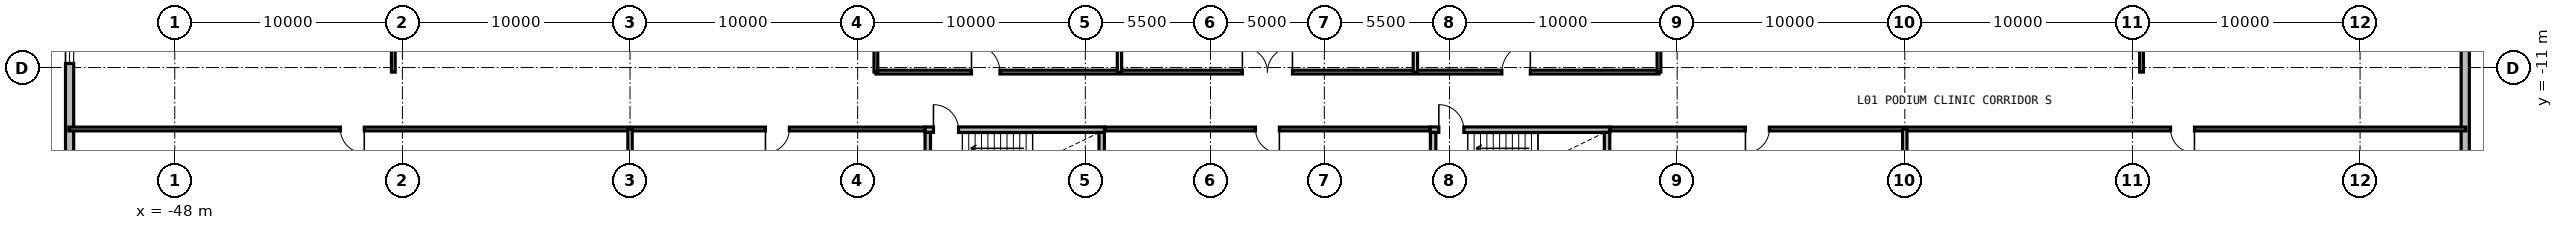
"""IFC4 building model, lengths in metres.
Left out: names, types, materials, properties, quantities, classifications, styles, units other than length and angle.
Written with IfcOpenShell. Run it as: python <this file> out.ifc"""

import sys

from ifc_helpers import new_model, si_unit, direction, frame, frame_2d, origin, place, context, subcontext, project, spatial, rectangle, extrude, source, transform, mapped, element, fill, save


model = new_model("IFC4")
c1 = context("Model", 3, precision=1e-05, world=origin(), true_north=direction((0.0, 1.0)))
c2 = subcontext(c1, "Body", "Model", "MODEL_VIEW")
j1 = project(units=[si_unit("LENGTHUNIT", "METRE"), si_unit("PLANEANGLEUNIT", "RADIAN")], contexts=[c1])
p1 = place(None, origin())
s1 = spatial("IfcSite", under=j1, at=p1, CompositionType="ELEMENT")
p2 = place(p1, origin())
s2 = spatial("IfcBuilding", under=s1, at=p2, CompositionType="ELEMENT")
p3 = place(p2, frame((0.0, 0.0, 4.2)))
s3 = spatial("IfcBuildingStorey", under=s2, at=p3, CompositionType="ELEMENT", Elevation=4.2)
m1 = source(origin(), c2, "Body", "SweptSolid", [
    extrude(rectangle(XDim=46.44, YDim=0.36, at=frame_2d((23.22, 0.0))), origin(), (0.0, 0.0, 1.0), 3.88),
])
p4 = place(p3, frame((-52.62, -23.22, 0.0), z_axis=(0.0, 0.0, 1.0), x_axis=(0.0, 1.0, 0.0)))
e1 = element("IfcWall", 1, at=p4, inside=s3, PredefinedType="SOLIDWALL", context=c2, shape_type="MappedRepresentation", body=[
    mapped(m1, transform((0.0, 0.0, 0.0), x_axis=(1.0, 0.0, 0.0), y_axis=(0.0, 1.0, 0.0), z_axis=(0.0, 0.0, 1.0), scale=1.0)),
])
p5 = place(p4, frame((4.0, 0.0, 0.85)))
e2 = element("IfcOpeningElement", 2, at=p5, cuts=e1, PredefinedType="OPENING", context=c2, shape_type="SweptSolid", body=[
    extrude(rectangle(XDim=3.0, YDim=2.1, at=frame_2d((1.5, 1.05))), frame((0.0, 0.19, 0.0), z_axis=(0.0, -1.0, 0.0), x_axis=(1.0, 0.0, 0.0)), (0.0, 0.0, 1.0), 0.38),
])
p6 = place(p4, frame((12.4, 0.0, 0.9)))
e3 = element("IfcOpeningElement", 3, at=p6, cuts=e1, PredefinedType="OPENING", context=c2, shape_type="SweptSolid", body=[
    extrude(rectangle(XDim=1.8, YDim=2.0, at=frame_2d((0.9, 1.0))), frame((0.0, 0.19, 0.0), z_axis=(0.0, -1.0, 0.0), x_axis=(1.0, 0.0, 0.0)), (0.0, 0.0, 1.0), 0.38),
])
p7 = place(p3, frame((52.62, 23.22, 0.0), z_axis=(0.0, 0.0, 1.0), x_axis=(0.0, -1.0, 0.0)))
e4 = element("IfcWall", 4, at=p7, inside=s3, PredefinedType="SOLIDWALL", context=c2, shape_type="MappedRepresentation", body=[
    mapped(m1, transform((0.0, 0.0, 0.0), x_axis=(1.0, 0.0, 0.0), y_axis=(0.0, 1.0, 0.0), z_axis=(0.0, 0.0, 1.0), scale=1.0)),
])
p8 = place(p7, frame((4.0, 0.0, 0.85)))
e5 = element("IfcOpeningElement", 5, at=p8, cuts=e4, PredefinedType="OPENING", context=c2, shape_type="SweptSolid", body=[
    extrude(rectangle(XDim=3.0, YDim=2.1, at=frame_2d((1.5, 1.05))), frame((0.0, 0.19, 0.0), z_axis=(0.0, -1.0, 0.0), x_axis=(1.0, 0.0, 0.0)), (0.0, 0.0, 1.0), 0.38),
])
p9 = place(p7, frame((29.2, 0.0, 0.85)))
e6 = element("IfcOpeningElement", 6, at=p9, cuts=e4, PredefinedType="OPENING", context=c2, shape_type="SweptSolid", body=[
    extrude(rectangle(XDim=3.0, YDim=2.1, at=frame_2d((1.5, 1.05))), frame((0.0, 0.19, 0.0), z_axis=(0.0, -1.0, 0.0), x_axis=(1.0, 0.0, 0.0)), (0.0, 0.0, 1.0), 0.38),
])
m2 = source(origin(), c2, "Body", "SweptSolid", [
    extrude(rectangle(XDim=7.88, YDim=0.24, at=frame_2d((3.94, 0.0))), origin(), (0.0, 0.0, 1.0), 3.88),
])
p10 = place(p3, frame((-15.04, -13.73, 0.0), z_axis=(0.0, 0.0, 1.0), x_axis=(1.0, 0.0, 0.0)))
e7 = element("IfcWall", 7, at=p10, inside=s3, PredefinedType="PARTITIONING", context=c2, shape_type="MappedRepresentation", body=[
    mapped(m2, transform((0.0, 0.0, 0.0), x_axis=(1.0, 0.0, 0.0), y_axis=(0.0, 1.0, 0.0), z_axis=(0.0, 0.0, 1.0), scale=1.0)),
])
p11 = place(p10, frame((0.37, 0.0, 0.0)))
e8 = element("IfcOpeningElement", 8, at=p11, cuts=e7, PredefinedType="OPENING", context=c2, shape_type="SweptSolid", body=[
    extrude(rectangle(XDim=1.1, YDim=2.15, at=frame_2d((0.55, 1.075))), frame((0.0, 0.13, 0.0), z_axis=(0.0, -1.0, 0.0), x_axis=(1.0, 0.0, 0.0)), (0.0, 0.0, 1.0), 0.26),
])
m3 = source(origin(), c2, "Body", "SweptSolid", [
    extrude(rectangle(XDim=2.95, YDim=0.24, at=frame_2d((1.475, 0.0))), origin(), (0.0, 0.0, 1.0), 3.88),
])
for number, where, z_axis, x_axis in (
    (9, (-14.92, -16.8, 0.0), (0.0, 0.0, 1.0), (0.0, 1.0, 0.0)),
    (10, (-7.28, -16.8, 0.0), (0.0, 0.0, 1.0), (0.0, 1.0, 0.0)),
):
    element("IfcWall", number, at=place(p3, frame(where, z_axis=z_axis, x_axis=x_axis)), inside=s3, PredefinedType="PARTITIONING", context=c2, shape_type="MappedRepresentation", body=[
        mapped(m3, transform((0.0, 0.0, 0.0), x_axis=(1.0, 0.0, 0.0), y_axis=(0.0, 1.0, 0.0), z_axis=(0.0, 0.0, 1.0), scale=1.0)),
    ])
p12 = place(p3, frame((7.16, -13.73, 0.0), z_axis=(0.0, 0.0, 1.0), x_axis=(1.0, 0.0, 0.0)))
e11 = element("IfcWall", 11, at=p12, inside=s3, PredefinedType="PARTITIONING", context=c2, shape_type="MappedRepresentation", body=[
    mapped(m2, transform((0.0, 0.0, 0.0), x_axis=(1.0, 0.0, 0.0), y_axis=(0.0, 1.0, 0.0), z_axis=(0.0, 0.0, 1.0), scale=1.0)),
])
p13 = place(p12, frame((0.37, 0.0, 0.0)))
e12 = element("IfcOpeningElement", 12, at=p13, cuts=e11, PredefinedType="OPENING", context=c2, shape_type="SweptSolid", body=[
    extrude(rectangle(XDim=1.1, YDim=2.15, at=frame_2d((0.55, 1.075))), frame((0.0, 0.13, 0.0), z_axis=(0.0, -1.0, 0.0), x_axis=(1.0, 0.0, 0.0)), (0.0, 0.0, 1.0), 0.26),
])
for number, where, z_axis, x_axis in (
    (13, (7.28, -16.8, 0.0), (0.0, 0.0, 1.0), (0.0, 1.0, 0.0)),
    (14, (14.92, -16.8, 0.0), (0.0, 0.0, 1.0), (0.0, 1.0, 0.0)),
):
    element("IfcWall", number, at=place(p3, frame(where, z_axis=z_axis, x_axis=x_axis)), inside=s3, PredefinedType="PARTITIONING", context=c2, shape_type="MappedRepresentation", body=[
        mapped(m3, transform((0.0, 0.0, 0.0), x_axis=(1.0, 0.0, 0.0), y_axis=(0.0, 1.0, 0.0), z_axis=(0.0, 0.0, 1.0), scale=1.0)),
    ])
m4 = source(origin(), c2, "Body", "SweptSolid", [
    extrude(rectangle(XDim=17.6, YDim=0.165, at=frame_2d((8.8, 0.0))), origin(), (0.0, 0.0, 1.0), 3.865),
])
p14 = place(p3, frame((-38.4, -11.2, 0.0), z_axis=(0.0, 0.0, 1.0), x_axis=(0.0, 1.0, 0.0)))
e15 = element("IfcWall", 15, at=p14, inside=s3, PredefinedType="PARTITIONING", context=c2, shape_type="MappedRepresentation", body=[
    mapped(m4, transform((0.0, 0.0, 0.0), x_axis=(1.0, 0.0, 0.0), y_axis=(0.0, 1.0, 0.0), z_axis=(0.0, 0.0, 1.0), scale=1.0)),
])
p15 = place(p14, frame((4.2, 0.0, 0.0)))
e16 = element("IfcOpeningElement", 16, at=p15, cuts=e15, PredefinedType="OPENING", context=c2, shape_type="SweptSolid", body=[
    extrude(rectangle(XDim=1.25, YDim=2.2, at=frame_2d((0.625, 1.1))), frame((0.0, 0.093, 0.0), z_axis=(0.0, -1.0, 0.0), x_axis=(1.0, 0.0, 0.0)), (0.0, 0.0, 1.0), 0.185),
])
p16 = place(p14, frame((13.5, 0.0, 0.0)))
e17 = element("IfcOpeningElement", 17, at=p16, cuts=e15, PredefinedType="OPENING", context=c2, shape_type="SweptSolid", body=[
    extrude(rectangle(XDim=1.25, YDim=2.2, at=frame_2d((0.625, 1.1))), frame((0.0, 0.093, 0.0), z_axis=(0.0, -1.0, 0.0), x_axis=(1.0, 0.0, 0.0)), (0.0, 0.0, 1.0), 0.185),
])
p17 = place(p3, frame((38.4, -11.2, 0.0), z_axis=(0.0, 0.0, 1.0), x_axis=(0.0, 1.0, 0.0)))
e18 = element("IfcWall", 18, at=p17, inside=s3, PredefinedType="PARTITIONING", context=c2, shape_type="MappedRepresentation", body=[
    mapped(m4, transform((0.0, 0.0, 0.0), x_axis=(1.0, 0.0, 0.0), y_axis=(0.0, 1.0, 0.0), z_axis=(0.0, 0.0, 1.0), scale=1.0)),
])
p18 = place(p17, frame((4.2, 0.0, 0.0)))
e19 = element("IfcOpeningElement", 19, at=p18, cuts=e18, PredefinedType="OPENING", context=c2, shape_type="SweptSolid", body=[
    extrude(rectangle(XDim=1.25, YDim=2.2, at=frame_2d((0.625, 1.1))), frame((0.0, 0.093, 0.0), z_axis=(0.0, -1.0, 0.0), x_axis=(1.0, 0.0, 0.0)), (0.0, 0.0, 1.0), 0.185),
])
p19 = place(p17, frame((13.5, 0.0, 0.0)))
e20 = element("IfcOpeningElement", 20, at=p19, cuts=e18, PredefinedType="OPENING", context=c2, shape_type="SweptSolid", body=[
    extrude(rectangle(XDim=1.25, YDim=2.2, at=frame_2d((0.625, 1.1))), frame((0.0, 0.093, 0.0), z_axis=(0.0, -1.0, 0.0), x_axis=(1.0, 0.0, 0.0)), (0.0, 0.0, 1.0), 0.185),
])
m5 = source(origin(), c2, "Body", "SweptSolid", [
    extrude(rectangle(XDim=34.4, YDim=0.165, at=frame_2d((17.2, 0.0))), origin(), (0.0, 0.0, 1.0), 3.865),
])
p20 = place(p3, frame((-17.2, -11.2, 0.0), z_axis=(0.0, 0.0, 1.0), x_axis=(1.0, 0.0, 0.0)))
e21 = element("IfcWall", 21, at=p20, inside=s3, PredefinedType="PARTITIONING", context=c2, shape_type="MappedRepresentation", body=[
    mapped(m5, transform((0.0, 0.0, 0.0), x_axis=(1.0, 0.0, 0.0), y_axis=(0.0, 1.0, 0.0), z_axis=(0.0, 0.0, 1.0), scale=1.0)),
])
p21 = place(p20, frame((4.2, 0.0, 0.0)))
e22 = element("IfcOpeningElement", 22, at=p21, cuts=e21, PredefinedType="OPENING", context=c2, shape_type="SweptSolid", body=[
    extrude(rectangle(XDim=1.25, YDim=2.2, at=frame_2d((0.625, 1.1))), frame((0.0, 0.093, 0.0), z_axis=(0.0, -1.0, 0.0), x_axis=(1.0, 0.0, 0.0)), (0.0, 0.0, 1.0), 0.185),
])
p22 = place(p20, frame((16.1, 0.0, 0.0)))
e23 = element("IfcOpeningElement", 23, at=p22, cuts=e21, PredefinedType="OPENING", context=c2, shape_type="SweptSolid", body=[
    extrude(rectangle(XDim=2.2, YDim=2.4, at=frame_2d((1.1, 1.2))), frame((0.0, 0.093, 0.0), z_axis=(0.0, -1.0, 0.0), x_axis=(1.0, 0.0, 0.0)), (0.0, 0.0, 1.0), 0.185),
])
p23 = place(p20, frame((27.5, 0.0, 0.0)))
e24 = element("IfcOpeningElement", 24, at=p23, cuts=e21, PredefinedType="OPENING", context=c2, shape_type="SweptSolid", body=[
    extrude(rectangle(XDim=1.25, YDim=2.2, at=frame_2d((0.625, 1.1))), frame((0.0, 0.093, 0.0), z_axis=(0.0, -1.0, 0.0), x_axis=(1.0, 0.0, 0.0)), (0.0, 0.0, 1.0), 0.185),
])
for number, where, z_axis, x_axis in (
    (25, (-17.2, -11.2, 0.0), (0.0, 0.0, 1.0), (0.0, 1.0, 0.0)),
    (26, (17.2, -11.2, 0.0), (0.0, 0.0, 1.0), (0.0, 1.0, 0.0)),
):
    element("IfcWall", number, at=place(p3, frame(where, z_axis=z_axis, x_axis=x_axis)), inside=s3, PredefinedType="PARTITIONING", context=c2, shape_type="MappedRepresentation", body=[
        mapped(m4, transform((0.0, 0.0, 0.0), x_axis=(1.0, 0.0, 0.0), y_axis=(0.0, 1.0, 0.0), z_axis=(0.0, 0.0, 1.0), scale=1.0)),
    ])
m6 = source(origin(), c2, "Body", "SweptSolid", [
    extrude(rectangle(XDim=17.6, YDim=0.19, at=frame_2d((8.8, 0.0))), origin(), (0.0, 0.0, 1.0), 3.215),
])
for number, where, z_axis, x_axis in (
    (27, (-6.5, -11.2, 0.0), (0.0, 0.0, 1.0), (0.0, 1.0, 0.0)),
    (28, (6.5, -11.2, 0.0), (0.0, 0.0, 1.0), (0.0, 1.0, 0.0)),
):
    element("IfcWall", number, at=place(p3, frame(where, z_axis=z_axis, x_axis=x_axis)), inside=s3, PredefinedType="PARTITIONING", context=c2, shape_type="MappedRepresentation", body=[
        mapped(m6, transform((0.0, 0.0, 0.0), x_axis=(1.0, 0.0, 0.0), y_axis=(0.0, 1.0, 0.0), z_axis=(0.0, 0.0, 1.0), scale=1.0)),
    ])
m7 = source(origin(), c2, "Body", "SweptSolid", [
    extrude(rectangle(XDim=37.6, YDim=0.165, at=frame_2d((18.8, 0.0))), origin(), (0.0, 0.0, 1.0), 3.865),
])
p24 = place(p3, frame((-52.65, -13.7, 0.0), z_axis=(0.0, 0.0, 1.0), x_axis=(1.0, 0.0, 0.0)))
e29 = element("IfcWall", 29, at=p24, inside=s3, PredefinedType="PARTITIONING", context=c2, shape_type="MappedRepresentation", body=[
    mapped(m7, transform((0.0, 0.0, 0.0), x_axis=(1.0, 0.0, 0.0), y_axis=(0.0, 1.0, 0.0), z_axis=(0.0, 0.0, 1.0), scale=1.0)),
])
p25 = place(p24, frame((11.925, 0.0, 0.0)))
e30 = element("IfcOpeningElement", 30, at=p25, cuts=e29, PredefinedType="OPENING", context=c2, shape_type="SweptSolid", body=[
    extrude(rectangle(XDim=1.05, YDim=2.15, at=frame_2d((0.525, 1.075))), frame((0.0, 0.093, 0.0), z_axis=(0.0, -1.0, 0.0), x_axis=(1.0, 0.0, 0.0)), (0.0, 0.0, 1.0), 0.185),
])
p26 = place(p24, frame((30.6, 0.0, 0.0)))
e31 = element("IfcOpeningElement", 31, at=p26, cuts=e29, PredefinedType="OPENING", context=c2, shape_type="SweptSolid", body=[
    extrude(rectangle(XDim=1.05, YDim=2.15, at=frame_2d((0.525, 1.075))), frame((0.0, 0.093, 0.0), z_axis=(0.0, -1.0, 0.0), x_axis=(1.0, 0.0, 0.0)), (0.0, 0.0, 1.0), 0.185),
])
m8 = source(origin(), c2, "Body", "SweptSolid", [
    extrude(rectangle(XDim=14.3, YDim=0.165, at=frame_2d((7.15, 0.0))), origin(), (0.0, 0.0, 1.0), 3.865),
])
p27 = place(p3, frame((-7.15, -13.7, 0.0), z_axis=(0.0, 0.0, 1.0), x_axis=(1.0, 0.0, 0.0)))
e32 = element("IfcWall", 32, at=p27, inside=s3, PredefinedType="PARTITIONING", context=c2, shape_type="MappedRepresentation", body=[
    mapped(m8, transform((0.0, 0.0, 0.0), x_axis=(1.0, 0.0, 0.0), y_axis=(0.0, 1.0, 0.0), z_axis=(0.0, 0.0, 1.0), scale=1.0)),
])
p28 = place(p27, frame((6.625, 0.0, 0.0)))
e33 = element("IfcOpeningElement", 33, at=p28, cuts=e32, PredefinedType="OPENING", context=c2, shape_type="SweptSolid", body=[
    extrude(rectangle(XDim=1.05, YDim=2.15, at=frame_2d((0.525, 1.075))), frame((0.0, 0.093, 0.0), z_axis=(0.0, -1.0, 0.0), x_axis=(1.0, 0.0, 0.0)), (0.0, 0.0, 1.0), 0.185),
])
p29 = place(p3, frame((15.05, -13.7, 0.0), z_axis=(0.0, 0.0, 1.0), x_axis=(1.0, 0.0, 0.0)))
e34 = element("IfcWall", 34, at=p29, inside=s3, PredefinedType="PARTITIONING", context=c2, shape_type="MappedRepresentation", body=[
    mapped(m7, transform((0.0, 0.0, 0.0), x_axis=(1.0, 0.0, 0.0), y_axis=(0.0, 1.0, 0.0), z_axis=(0.0, 0.0, 1.0), scale=1.0)),
])
p30 = place(p29, frame((5.95, 0.0, 0.0)))
e35 = element("IfcOpeningElement", 35, at=p30, cuts=e34, PredefinedType="OPENING", context=c2, shape_type="SweptSolid", body=[
    extrude(rectangle(XDim=1.05, YDim=2.15, at=frame_2d((0.525, 1.075))), frame((0.0, 0.093, 0.0), z_axis=(0.0, -1.0, 0.0), x_axis=(1.0, 0.0, 0.0)), (0.0, 0.0, 1.0), 0.185),
])
p31 = place(p29, frame((24.625, 0.0, 0.0)))
e36 = element("IfcOpeningElement", 36, at=p31, cuts=e34, PredefinedType="OPENING", context=c2, shape_type="SweptSolid", body=[
    extrude(rectangle(XDim=1.05, YDim=2.15, at=frame_2d((0.525, 1.075))), frame((0.0, 0.093, 0.0), z_axis=(0.0, -1.0, 0.0), x_axis=(1.0, 0.0, 0.0)), (0.0, 0.0, 1.0), 0.185),
])
m9 = source(origin(), c2, "Body", "SweptSolid", [
    extrude(rectangle(XDim=9.6, YDim=0.19, at=frame_2d((4.8, 0.0))), origin(), (0.0, 0.0, 1.0), 3.865),
])
for number, where, z_axis, x_axis in (
    (37, (-28.0, -23.3, 0.0), (0.0, 0.0, 1.0), (0.0, 1.0, 0.0)),
    (38, (28.0, -23.3, 0.0), (0.0, 0.0, 1.0), (0.0, 1.0, 0.0)),
):
    element("IfcWall", number, at=place(p3, frame(where, z_axis=z_axis, x_axis=x_axis)), inside=s3, PredefinedType="PARTITIONING", context=c2, shape_type="MappedRepresentation", body=[
        mapped(m9, transform((0.0, 0.0, 0.0), x_axis=(1.0, 0.0, 0.0), y_axis=(0.0, 1.0, 0.0), z_axis=(0.0, 0.0, 1.0), scale=1.0)),
    ])
m10 = source(origin(), c2, "Body", "SweptSolid", [
    extrude(rectangle(XDim=1.8, YDim=2.0, at=frame_2d((0.9, 1.0))), frame((0.0, 0.03, 0.0), z_axis=(0.0, -1.0, 0.0), x_axis=(1.0, 0.0, 0.0)), (0.0, 0.0, 1.0), 0.06),
])
p32 = place(p6, origin())
e39 = element("IfcWindow", 39, at=p32, inside=s3, PartitioningType="SINGLE_PANEL", PredefinedType="WINDOW", context=c2, shape_type="MappedRepresentation", body=[
    mapped(m10, transform((0.0, 0.0, 0.0), x_axis=(1.0, 0.0, 0.0), y_axis=(0.0, 1.0, 0.0), z_axis=(0.0, 0.0, 1.0), scale=1.0)),
])
fill(e3, e39)
m11 = source(origin(), c2, "Body", "SweptSolid", [
    extrude(rectangle(XDim=1.1, YDim=2.15, at=frame_2d((0.55, 1.075))), frame((0.0, 0.025, 0.0), z_axis=(0.0, -1.0, 0.0), x_axis=(1.0, 0.0, 0.0)), (0.0, 0.0, 1.0), 0.05),
])
p33 = place(p11, origin())
e40 = element("IfcDoor", 40, at=p33, inside=s3, OperationType="SINGLE_SWING_LEFT", PredefinedType="DOOR", context=c2, shape_type="MappedRepresentation", body=[
    mapped(m11, transform((0.0, 0.0, 0.0), x_axis=(1.0, 0.0, 0.0), y_axis=(0.0, 1.0, 0.0), z_axis=(0.0, 0.0, 1.0), scale=1.0)),
])
fill(e8, e40)
p34 = place(p13, origin())
e41 = element("IfcDoor", 41, at=p34, inside=s3, OperationType="SINGLE_SWING_LEFT", PredefinedType="DOOR", context=c2, shape_type="MappedRepresentation", body=[
    mapped(m11, transform((0.0, 0.0, 0.0), x_axis=(1.0, 0.0, 0.0), y_axis=(0.0, 1.0, 0.0), z_axis=(0.0, 0.0, 1.0), scale=1.0)),
])
fill(e12, e41)
m12 = source(origin(), c2, "Body", "SweptSolid", [
    extrude(rectangle(XDim=1.25, YDim=2.2, at=frame_2d((0.625, 1.1))), frame((0.0, 0.025, 0.0), z_axis=(0.0, -1.0, 0.0), x_axis=(1.0, 0.0, 0.0)), (0.0, 0.0, 1.0), 0.05),
])
p35 = place(p21, origin())
e42 = element("IfcDoor", 42, at=p35, inside=s3, OperationType="SINGLE_SWING_LEFT", PredefinedType="DOOR", context=c2, shape_type="MappedRepresentation", body=[
    mapped(m12, transform((0.0, 0.0, 0.0), x_axis=(1.0, 0.0, 0.0), y_axis=(0.0, 1.0, 0.0), z_axis=(0.0, 0.0, 1.0), scale=1.0)),
])
fill(e22, e42)
m13 = source(origin(), c2, "Body", "SweptSolid", [
    extrude(rectangle(XDim=2.2, YDim=2.4, at=frame_2d((1.1, 1.2))), frame((0.0, 0.025, 0.0), z_axis=(0.0, -1.0, 0.0), x_axis=(1.0, 0.0, 0.0)), (0.0, 0.0, 1.0), 0.05),
])
p36 = place(p22, origin())
e43 = element("IfcDoor", 43, at=p36, inside=s3, OperationType="DOUBLE_DOOR_SINGLE_SWING", PredefinedType="DOOR", context=c2, shape_type="MappedRepresentation", body=[
    mapped(m13, transform((0.0, 0.0, 0.0), x_axis=(1.0, 0.0, 0.0), y_axis=(0.0, 1.0, 0.0), z_axis=(0.0, 0.0, 1.0), scale=1.0)),
])
fill(e23, e43)
p37 = place(p23, origin())
e44 = element("IfcDoor", 44, at=p37, inside=s3, OperationType="SINGLE_SWING_RIGHT", PredefinedType="DOOR", context=c2, shape_type="MappedRepresentation", body=[
    mapped(m12, transform((0.0, 0.0, 0.0), x_axis=(1.0, 0.0, 0.0), y_axis=(0.0, 1.0, 0.0), z_axis=(0.0, 0.0, 1.0), scale=1.0)),
])
fill(e24, e44)
m14 = source(origin(), c2, "Body", "SweptSolid", [
    extrude(rectangle(XDim=1.05, YDim=2.15, at=frame_2d((0.525, 1.075))), frame((0.0, 0.025, 0.0), z_axis=(0.0, -1.0, 0.0), x_axis=(1.0, 0.0, 0.0)), (0.0, 0.0, 1.0), 0.05),
])
p38 = place(p25, frame((1.05, 0.0, 0.0), z_axis=(0.0, 0.0, 1.0), x_axis=(-1.0, 0.0, 0.0)))
e45 = element("IfcDoor", 45, at=p38, inside=s3, OperationType="SINGLE_SWING_LEFT", PredefinedType="DOOR", context=c2, shape_type="MappedRepresentation", body=[
    mapped(m14, transform((0.0, 0.0, 0.0), x_axis=(1.0, 0.0, 0.0), y_axis=(0.0, 1.0, 0.0), z_axis=(0.0, 0.0, 1.0), scale=1.0)),
])
fill(e30, e45)
p39 = place(p26, frame((1.05, 0.0, 0.0), z_axis=(0.0, 0.0, 1.0), x_axis=(-1.0, 0.0, 0.0)))
e46 = element("IfcDoor", 46, at=p39, inside=s3, OperationType="SINGLE_SWING_RIGHT", PredefinedType="DOOR", context=c2, shape_type="MappedRepresentation", body=[
    mapped(m14, transform((0.0, 0.0, 0.0), x_axis=(1.0, 0.0, 0.0), y_axis=(0.0, 1.0, 0.0), z_axis=(0.0, 0.0, 1.0), scale=1.0)),
])
fill(e31, e46)
p40 = place(p28, frame((1.05, 0.0, 0.0), z_axis=(0.0, 0.0, 1.0), x_axis=(-1.0, 0.0, 0.0)))
e47 = element("IfcDoor", 47, at=p40, inside=s3, OperationType="SINGLE_SWING_LEFT", PredefinedType="DOOR", context=c2, shape_type="MappedRepresentation", body=[
    mapped(m14, transform((0.0, 0.0, 0.0), x_axis=(1.0, 0.0, 0.0), y_axis=(0.0, 1.0, 0.0), z_axis=(0.0, 0.0, 1.0), scale=1.0)),
])
fill(e33, e47)
p41 = place(p30, frame((1.05, 0.0, 0.0), z_axis=(0.0, 0.0, 1.0), x_axis=(-1.0, 0.0, 0.0)))
e48 = element("IfcDoor", 48, at=p41, inside=s3, OperationType="SINGLE_SWING_RIGHT", PredefinedType="DOOR", context=c2, shape_type="MappedRepresentation", body=[
    mapped(m14, transform((0.0, 0.0, 0.0), x_axis=(1.0, 0.0, 0.0), y_axis=(0.0, 1.0, 0.0), z_axis=(0.0, 0.0, 1.0), scale=1.0)),
])
fill(e35, e48)
p42 = place(p31, frame((1.05, 0.0, 0.0), z_axis=(0.0, 0.0, 1.0), x_axis=(-1.0, 0.0, 0.0)))
e49 = element("IfcDoor", 49, at=p42, inside=s3, OperationType="SINGLE_SWING_LEFT", PredefinedType="DOOR", context=c2, shape_type="MappedRepresentation", body=[
    mapped(m14, transform((0.0, 0.0, 0.0), x_axis=(1.0, 0.0, 0.0), y_axis=(0.0, 1.0, 0.0), z_axis=(0.0, 0.0, 1.0), scale=1.0)),
])
fill(e36, e49)
save(model, sys.argv[1])
